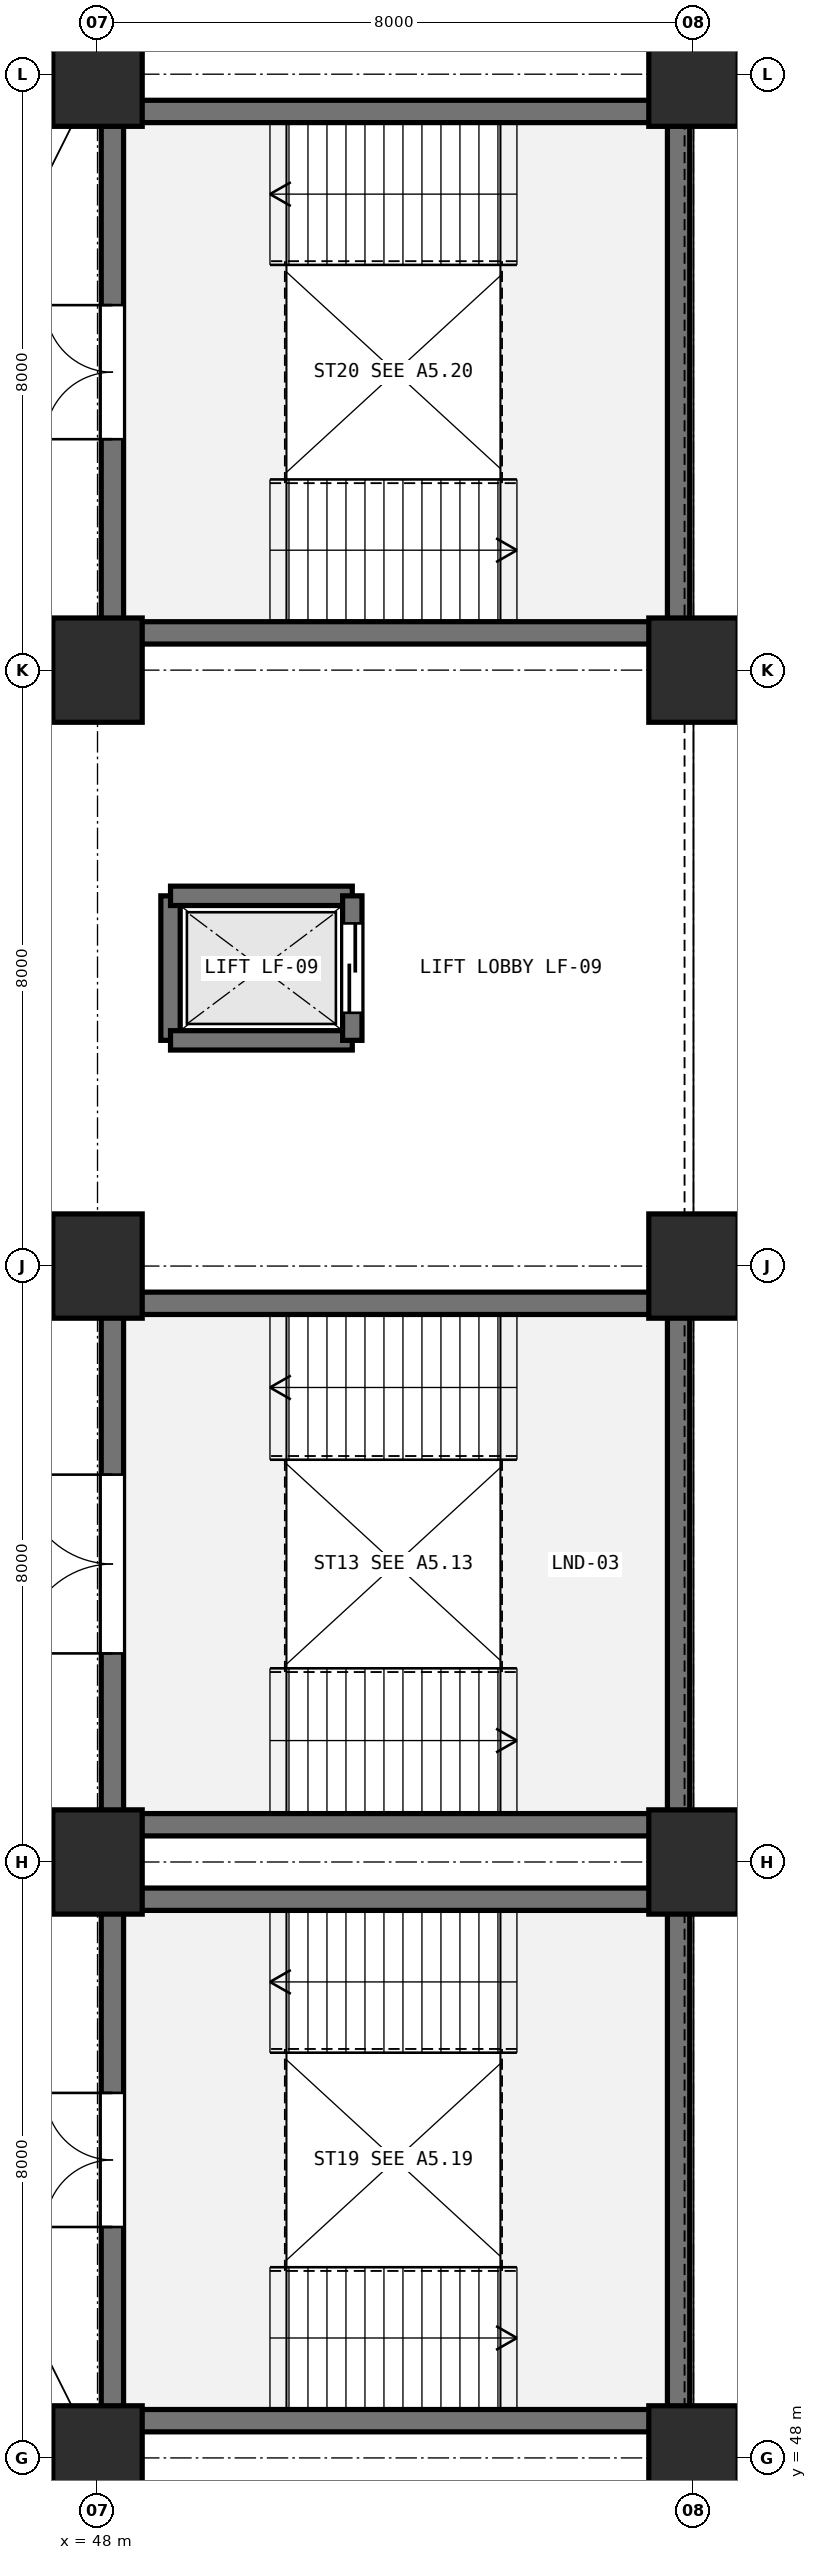
"""IFC4 building model, lengths in metres.
Left out: names, types, materials, properties, quantities, classifications, styles, units other than length and angle.
Written with IfcOpenShell. Run it as: python <this file> out.ifc"""

import sys

from ifc_helpers import new_model, si_unit, direction, frame, frame_2d, origin, origin_2d, place, context, subcontext, project, spatial, rectangle, extrude, element, fill, save


model = new_model("IFC4")
c1 = context("Model", 3, precision=1e-05, world=origin(), true_north=direction((0.0, 1.0)))
c2 = subcontext(c1, "Body", "Model", "MODEL_VIEW")
j1 = project(units=[si_unit("LENGTHUNIT", "METRE"), si_unit("PLANEANGLEUNIT", "RADIAN")], contexts=[c1])
p1 = place(None, origin())
s1 = spatial("IfcSite", under=j1, at=p1, CompositionType="ELEMENT")
p2 = place(p1, origin())
s2 = spatial("IfcBuilding", under=s1, at=p2, CompositionType="ELEMENT")
p3 = place(p2, frame((0.0, 0.0, 5.4)))
s3 = spatial("IfcBuildingStorey", under=s2, at=p3, CompositionType="ELEMENT", Elevation=5.4)
for number, where, z_axis, x_axis in (
    (1, (48.0, 48.0, 0.0), (0.0, 0.0, 1.0), (1.0, 0.0, 0.0)),
    (2, (48.0, 56.0, 0.0), (0.0, 0.0, 1.0), (1.0, 0.0, 0.0)),
    (3, (48.0, 64.0, 0.0), (0.0, 0.0, 1.0), (1.0, 0.0, 0.0)),
    (4, (48.0, 72.0, 0.0), (0.0, 0.0, 1.0), (1.0, 0.0, 0.0)),
    (5, (48.0, 80.0, 0.0), (0.0, 0.0, 1.0), (1.0, 0.0, 0.0)),
    (6, (56.0, 48.0, 0.0), (0.0, 0.0, 1.0), (1.0, 0.0, 0.0)),
    (7, (56.0, 56.0, 0.0), (0.0, 0.0, 1.0), (1.0, 0.0, 0.0)),
    (8, (56.0, 64.0, 0.0), (0.0, 0.0, 1.0), (1.0, 0.0, 0.0)),
    (9, (56.0, 72.0, 0.0), (0.0, 0.0, 1.0), (1.0, 0.0, 0.0)),
    (10, (56.0, 80.0, 0.0), (0.0, 0.0, 1.0), (1.0, 0.0, 0.0)),
):
    element("IfcColumn", number, at=place(p3, frame(where, z_axis=z_axis, x_axis=x_axis)), inside=s3, PredefinedType="COLUMN", context=c2, shape_type="SweptSolid", body=[
        extrude(rectangle(XDim=1.2, YDim=1.4, at=origin_2d()), origin(), (0.0, 0.0, 1.0), 4.8),
    ])
p4 = place(p3, frame((55.8, 56.5, 0.0), z_axis=(0.0, 0.0, 1.0), x_axis=(-1.0, 0.0, 0.0)))
e11 = element("IfcWall", 11, at=p4, inside=s3, PredefinedType="SHEAR", context=c2, shape_type="SweptSolid", body=[
    extrude(rectangle(XDim=7.6, YDim=0.3, at=frame_2d((3.8, 0.0))), origin(), (0.0, 0.0, 1.0), 4.48),
])
p5 = place(p3, frame((48.2, 56.5, 0.0), z_axis=(0.0, 0.0, 1.0), x_axis=(0.0, 1.0, 0.0)))
e12 = element("IfcWall", 12, at=p5, inside=s3, PredefinedType="SHEAR", context=c2, shape_type="SweptSolid", body=[
    extrude(rectangle(XDim=7.0, YDim=0.3, at=frame_2d((3.5, 0.0))), origin(), (0.0, 0.0, 1.0), 4.48),
])
p6 = place(p5, frame((2.3, 0.0, 0.0)))
e13 = element("IfcOpeningElement", 13, at=p6, cuts=e12, PredefinedType="OPENING", context=c2, shape_type="SweptSolid", body=[
    extrude(rectangle(XDim=2.4, YDim=2.2, at=frame_2d((1.2, 1.1))), frame((0.0, 0.16, 0.0), z_axis=(0.0, -1.0, 0.0), x_axis=(1.0, 0.0, 0.0)), (0.0, 0.0, 1.0), 0.32),
])
p7 = place(p3, frame((48.2, 63.5, 0.0), z_axis=(0.0, 0.0, 1.0), x_axis=(1.0, 0.0, 0.0)))
e14 = element("IfcWall", 14, at=p7, inside=s3, PredefinedType="SHEAR", context=c2, shape_type="SweptSolid", body=[
    extrude(rectangle(XDim=7.6, YDim=0.3, at=frame_2d((3.8, 0.0))), origin(), (0.0, 0.0, 1.0), 4.48),
])
p8 = place(p3, frame((55.8, 63.5, 0.0), z_axis=(0.0, 0.0, 1.0), x_axis=(0.0, -1.0, 0.0)))
e15 = element("IfcWall", 15, at=p8, inside=s3, PredefinedType="SHEAR", context=c2, shape_type="SweptSolid", body=[
    extrude(rectangle(XDim=7.0, YDim=0.3, at=frame_2d((3.5, 0.0))), origin(), (0.0, 0.0, 1.0), 4.48),
])
p9 = place(p3, frame((55.8, 48.5, 0.0), z_axis=(0.0, 0.0, 1.0), x_axis=(-1.0, 0.0, 0.0)))
e16 = element("IfcWall", 16, at=p9, inside=s3, PredefinedType="SHEAR", context=c2, shape_type="SweptSolid", body=[
    extrude(rectangle(XDim=7.6, YDim=0.3, at=frame_2d((3.8, 0.0))), origin(), (0.0, 0.0, 1.0), 4.48),
])
p10 = place(p3, frame((48.2, 48.5, 0.0), z_axis=(0.0, 0.0, 1.0), x_axis=(0.0, 1.0, 0.0)))
e17 = element("IfcWall", 17, at=p10, inside=s3, PredefinedType="SHEAR", context=c2, shape_type="SweptSolid", body=[
    extrude(rectangle(XDim=7.0, YDim=0.3, at=frame_2d((3.5, 0.0))), origin(), (0.0, 0.0, 1.0), 4.48),
])
p11 = place(p10, frame((2.6, 0.0, 0.0)))
e18 = element("IfcOpeningElement", 18, at=p11, cuts=e17, PredefinedType="OPENING", context=c2, shape_type="SweptSolid", body=[
    extrude(rectangle(XDim=1.8, YDim=2.2, at=frame_2d((0.9, 1.1))), frame((0.0, 0.16, 0.0), z_axis=(0.0, -1.0, 0.0), x_axis=(1.0, 0.0, 0.0)), (0.0, 0.0, 1.0), 0.32),
])
p12 = place(p3, frame((48.2, 55.5, 0.0), z_axis=(0.0, 0.0, 1.0), x_axis=(1.0, 0.0, 0.0)))
e19 = element("IfcWall", 19, at=p12, inside=s3, PredefinedType="SHEAR", context=c2, shape_type="SweptSolid", body=[
    extrude(rectangle(XDim=7.6, YDim=0.3, at=frame_2d((3.8, 0.0))), origin(), (0.0, 0.0, 1.0), 4.48),
])
p13 = place(p3, frame((55.8, 55.5, 0.0), z_axis=(0.0, 0.0, 1.0), x_axis=(0.0, -1.0, 0.0)))
e20 = element("IfcWall", 20, at=p13, inside=s3, PredefinedType="SHEAR", context=c2, shape_type="SweptSolid", body=[
    extrude(rectangle(XDim=7.0, YDim=0.3, at=frame_2d((3.5, 0.0))), origin(), (0.0, 0.0, 1.0), 4.48),
])
p14 = place(p3, frame((55.8, 72.5, 0.0), z_axis=(0.0, 0.0, 1.0), x_axis=(-1.0, 0.0, 0.0)))
e21 = element("IfcWall", 21, at=p14, inside=s3, PredefinedType="SHEAR", context=c2, shape_type="SweptSolid", body=[
    extrude(rectangle(XDim=7.6, YDim=0.3, at=frame_2d((3.8, 0.0))), origin(), (0.0, 0.0, 1.0), 4.48),
])
p15 = place(p3, frame((48.2, 72.5, 0.0), z_axis=(0.0, 0.0, 1.0), x_axis=(0.0, 1.0, 0.0)))
e22 = element("IfcWall", 22, at=p15, inside=s3, PredefinedType="SHEAR", context=c2, shape_type="SweptSolid", body=[
    extrude(rectangle(XDim=7.0, YDim=0.3, at=frame_2d((3.5, 0.0))), origin(), (0.0, 0.0, 1.0), 4.48),
])
p16 = place(p15, frame((2.6, 0.0, 0.0)))
e23 = element("IfcOpeningElement", 23, at=p16, cuts=e22, PredefinedType="OPENING", context=c2, shape_type="SweptSolid", body=[
    extrude(rectangle(XDim=1.8, YDim=2.2, at=frame_2d((0.9, 1.1))), frame((0.0, 0.16, 0.0), z_axis=(0.0, -1.0, 0.0), x_axis=(1.0, 0.0, 0.0)), (0.0, 0.0, 1.0), 0.32),
])
p17 = place(p3, frame((48.2, 79.5, 0.0), z_axis=(0.0, 0.0, 1.0), x_axis=(1.0, 0.0, 0.0)))
e24 = element("IfcWall", 24, at=p17, inside=s3, PredefinedType="SHEAR", context=c2, shape_type="SweptSolid", body=[
    extrude(rectangle(XDim=7.6, YDim=0.3, at=frame_2d((3.8, 0.0))), origin(), (0.0, 0.0, 1.0), 4.48),
])
p18 = place(p3, frame((55.8, 79.5, 0.0), z_axis=(0.0, 0.0, 1.0), x_axis=(0.0, -1.0, 0.0)))
e25 = element("IfcWall", 25, at=p18, inside=s3, PredefinedType="SHEAR", context=c2, shape_type="SweptSolid", body=[
    extrude(rectangle(XDim=7.0, YDim=0.3, at=frame_2d((3.5, 0.0))), origin(), (0.0, 0.0, 1.0), 4.48),
])
p19 = place(p3, frame((48.98, 67.03, 0.0), z_axis=(0.0, 0.0, 1.0), x_axis=(0.0, 1.0, 0.0)))
e26 = element("IfcWall", 26, at=p19, inside=s3, PredefinedType="SHEAR", context=c2, shape_type="SweptSolid", body=[
    extrude(rectangle(XDim=1.94, YDim=0.26, at=frame_2d((0.97, 0.0))), origin(), (0.0, 0.0, 1.0), 4.48),
])
for number, where, z_axis, x_axis in (
    (27, (48.98, 68.97, 0.0), (0.0, 0.0, 1.0), (1.0, 0.0, 0.0)),
    (28, (51.42, 67.03, 0.0), (0.0, 0.0, 1.0), (-1.0, 0.0, 0.0)),
):
    element("IfcWall", number, at=place(p3, frame(where, z_axis=z_axis, x_axis=x_axis)), inside=s3, PredefinedType="SHEAR", context=c2, shape_type="SweptSolid", body=[
        extrude(rectangle(XDim=2.44, YDim=0.26, at=frame_2d((1.22, 0.0))), origin(), (0.0, 0.0, 1.0), 4.48),
    ])
p20 = place(p3, frame((51.42, 68.97, 0.0), z_axis=(0.0, 0.0, 1.0), x_axis=(0.0, -1.0, 0.0)))
e29 = element("IfcWall", 29, at=p20, inside=s3, PredefinedType="SHEAR", context=c2, shape_type="SweptSolid", body=[
    extrude(rectangle(XDim=1.94, YDim=0.26, at=frame_2d((0.97, 0.0))), origin(), (0.0, 0.0, 1.0), 4.48),
])
p21 = place(p20, frame((0.37, 0.0, 0.0)))
e30 = element("IfcOpeningElement", 30, at=p21, cuts=e29, PredefinedType="OPENING", context=c2, shape_type="SweptSolid", body=[
    extrude(rectangle(XDim=1.2, YDim=2.15, at=frame_2d((0.6, 1.075))), frame((0.0, 0.14, 0.0), z_axis=(0.0, -1.0, 0.0), x_axis=(1.0, 0.0, 0.0)), (0.0, 0.0, 1.0), 0.28),
])
p22 = place(p6, frame((2.4, 0.0, 0.0), z_axis=(0.0, 0.0, 1.0), x_axis=(-1.0, 0.0, 0.0)))
e31 = element("IfcDoor", 31, at=p22, inside=s3, OperationType="DOUBLE_DOOR_SINGLE_SWING", PredefinedType="DOOR", context=c2, shape_type="SweptSolid", body=[
    extrude(rectangle(XDim=2.4, YDim=2.2, at=frame_2d((1.2, 1.1))), frame((0.0, 0.025, 0.0), z_axis=(0.0, -1.0, 0.0), x_axis=(1.0, 0.0, 0.0)), (0.0, 0.0, 1.0), 0.05),
])
fill(e13, e31)
p23 = place(p11, frame((1.8, 0.0, 0.0), z_axis=(0.0, 0.0, 1.0), x_axis=(-1.0, 0.0, 0.0)))
e32 = element("IfcDoor", 32, at=p23, inside=s3, OperationType="DOUBLE_DOOR_SINGLE_SWING", PredefinedType="DOOR", context=c2, shape_type="SweptSolid", body=[
    extrude(rectangle(XDim=1.8, YDim=2.2, at=frame_2d((0.9, 1.1))), frame((0.0, 0.025, 0.0), z_axis=(0.0, -1.0, 0.0), x_axis=(1.0, 0.0, 0.0)), (0.0, 0.0, 1.0), 0.05),
])
fill(e18, e32)
p24 = place(p16, frame((1.8, 0.0, 0.0), z_axis=(0.0, 0.0, 1.0), x_axis=(-1.0, 0.0, 0.0)))
e33 = element("IfcDoor", 33, at=p24, inside=s3, OperationType="DOUBLE_DOOR_SINGLE_SWING", PredefinedType="DOOR", context=c2, shape_type="SweptSolid", body=[
    extrude(rectangle(XDim=1.8, YDim=2.2, at=frame_2d((0.9, 1.1))), frame((0.0, 0.025, 0.0), z_axis=(0.0, -1.0, 0.0), x_axis=(1.0, 0.0, 0.0)), (0.0, 0.0, 1.0), 0.05),
])
fill(e23, e33)
p25 = place(p21, origin())
e34 = element("IfcDoor", 34, at=p25, inside=s3, OperationType="SLIDING_TO_LEFT", PredefinedType="DOOR", context=c2, shape_type="SweptSolid", body=[
    extrude(rectangle(XDim=1.2, YDim=2.15, at=frame_2d((0.6, 1.075))), frame((0.0, 0.025, 0.0), z_axis=(0.0, -1.0, 0.0), x_axis=(1.0, 0.0, 0.0)), (0.0, 0.0, 1.0), 0.05),
])
fill(e30, e34)
save(model, sys.argv[1])
